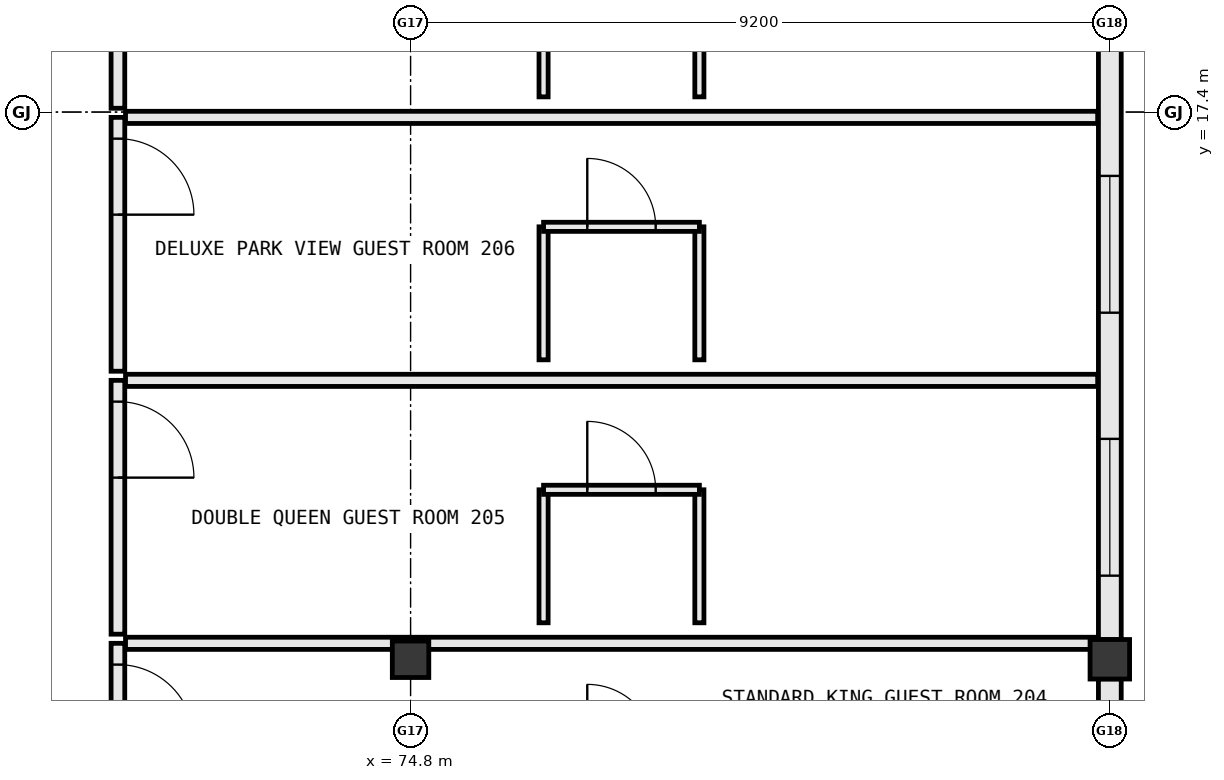
"""IFC4 building model, lengths in metres.
Left out: names, types, materials, properties, quantities, classifications, styles, units other than length and angle.
Written with IfcOpenShell. Run it as: python <this file> out.ifc"""

import sys

from ifc_helpers import new_model, si_unit, direction, frame, frame_2d, origin, origin_2d, place, context, subcontext, project, spatial, rectangle, extrude, element, fill, save


model = new_model("IFC4")
c1 = context("Model", 3, precision=1e-05, world=origin(), true_north=direction((0.0, 1.0)))
c2 = subcontext(c1, "Body", "Model", "MODEL_VIEW")
j1 = project(units=[si_unit("LENGTHUNIT", "METRE"), si_unit("PLANEANGLEUNIT", "RADIAN")], contexts=[c1])
p1 = place(None, origin())
s1 = spatial("IfcSite", under=j1, at=p1, CompositionType="ELEMENT")
p2 = place(p1, origin())
s2 = spatial("IfcBuilding", under=s1, at=p2, CompositionType="ELEMENT")
p3 = place(p2, frame((0.0, 0.0, 27.6)))
s3 = spatial("IfcBuildingStorey", under=s2, at=p3, CompositionType="ELEMENT", Elevation=27.6)
p4 = place(p3, frame((74.8, 10.2, 0.0), z_axis=(0.0, 0.0, 1.0), x_axis=(1.0, 0.0, 0.0)))
e1 = element("IfcColumn", 1, at=p4, inside=s3, PredefinedType="COLUMN", context=c2, shape_type="SweptSolid", body=[
    extrude(rectangle(XDim=0.48, YDim=0.48, at=origin_2d()), origin(), (0.0, 0.0, 1.0), 3.8),
])
p5 = place(p3, frame((84.0, 10.2, 0.0), z_axis=(0.0, 0.0, 1.0), x_axis=(1.0, 0.0, 0.0)))
e2 = element("IfcColumn", 2, at=p5, inside=s3, PredefinedType="COLUMN", context=c2, shape_type="SweptSolid", body=[
    extrude(rectangle(XDim=0.52, YDim=0.52, at=origin_2d()), origin(), (0.0, 0.0, 1.0), 3.8),
])
p6 = place(p3, frame((84.0, 0.858, 0.0), z_axis=(0.0, 0.0, 1.0), x_axis=(0.0, 1.0, 0.0)))
e3 = element("IfcWall", 3, at=p6, inside=s3, PredefinedType="STANDARD", context=c2, shape_type="SweptSolid", body=[
    extrude(rectangle(XDim=9.084, YDim=0.3, at=frame_2d((4.542, 0.0))), origin(), (0.0, 0.0, 1.0), 2.97),
])
p7 = place(p6, frame((0.416, 0.0, 0.85)))
e4 = element("IfcOpeningElement", 4, at=p7, cuts=e3, PredefinedType="OPENING", context=c2, shape_type="SweptSolid", body=[
    extrude(rectangle(XDim=1.8, YDim=1.85, at=frame_2d((0.9, 0.925))), frame((0.0, 0.162, 0.0), z_axis=(0.0, -1.0, 0.0), x_axis=(1.0, 0.0, 0.0)), (0.0, 0.0, 1.0), 0.324),
])
p8 = place(p6, frame((3.522, 0.0, 0.85)))
e5 = element("IfcOpeningElement", 5, at=p8, cuts=e3, PredefinedType="OPENING", context=c2, shape_type="SweptSolid", body=[
    extrude(rectangle(XDim=1.8, YDim=1.85, at=frame_2d((0.9, 0.925))), frame((0.0, 0.162, 0.0), z_axis=(0.0, -1.0, 0.0), x_axis=(1.0, 0.0, 0.0)), (0.0, 0.0, 1.0), 0.324),
])
p9 = place(p6, frame((6.748, 0.0, 0.85)))
e6 = element("IfcOpeningElement", 6, at=p9, cuts=e3, PredefinedType="OPENING", context=c2, shape_type="SweptSolid", body=[
    extrude(rectangle(XDim=1.8, YDim=1.85, at=frame_2d((0.9, 0.925))), frame((0.0, 0.162, 0.0), z_axis=(0.0, -1.0, 0.0), x_axis=(1.0, 0.0, 0.0)), (0.0, 0.0, 1.0), 0.324),
])
p10 = place(p3, frame((84.0, 10.458, 0.0), z_axis=(0.0, 0.0, 1.0), x_axis=(0.0, 1.0, 0.0)))
e7 = element("IfcWall", 7, at=p10, inside=s3, PredefinedType="STANDARD", context=c2, shape_type="SweptSolid", body=[
    extrude(rectangle(XDim=7.884, YDim=0.3, at=frame_2d((3.942, 0.0))), origin(), (0.0, 0.0, 1.0), 2.97),
])
p11 = place(p10, frame((0.842, 0.0, 0.85)))
e8 = element("IfcOpeningElement", 8, at=p11, cuts=e7, PredefinedType="OPENING", context=c2, shape_type="SweptSolid", body=[
    extrude(rectangle(XDim=1.8, YDim=1.85, at=frame_2d((0.9, 0.925))), frame((0.0, 0.162, 0.0), z_axis=(0.0, -1.0, 0.0), x_axis=(1.0, 0.0, 0.0)), (0.0, 0.0, 1.0), 0.324),
])
p12 = place(p10, frame((4.302, 0.0, 0.85)))
e9 = element("IfcOpeningElement", 9, at=p12, cuts=e7, PredefinedType="OPENING", context=c2, shape_type="SweptSolid", body=[
    extrude(rectangle(XDim=1.8, YDim=1.85, at=frame_2d((0.9, 0.925))), frame((0.0, 0.162, 0.0), z_axis=(0.0, -1.0, 0.0), x_axis=(1.0, 0.0, 0.0)), (0.0, 0.0, 1.0), 0.324),
])
p13 = place(p3, frame((70.95, 10.41, 0.0), z_axis=(0.0, 0.0, 1.0), x_axis=(0.0, -1.0, 0.0)))
e10 = element("IfcWall", 10, at=p13, inside=s3, PredefinedType="PARTITIONING", context=c2, shape_type="SweptSolid", body=[
    extrude(rectangle(XDim=3.34, YDim=0.18, at=frame_2d((1.67, 0.0))), origin(), (0.0, 0.0, 1.0), 3.555),
])
p14 = place(p13, frame((0.28, 0.0, 0.0)))
e11 = element("IfcOpeningElement", 11, at=p14, cuts=e10, PredefinedType="OPENING", context=c2, shape_type="SweptSolid", body=[
    extrude(rectangle(XDim=1.0, YDim=2.2, at=frame_2d((0.5, 1.1))), frame((0.0, 0.102, 0.0), z_axis=(0.0, -1.0, 0.0), x_axis=(1.0, 0.0, 0.0)), (0.0, 0.0, 1.0), 0.204),
])
p15 = place(p3, frame((71.05, 10.41, 0.0), z_axis=(0.0, 0.0, 1.0), x_axis=(1.0, 0.0, 0.0)))
e12 = element("IfcWall", 12, at=p15, inside=s3, PredefinedType="PARTITIONING", context=c2, shape_type="SweptSolid", body=[
    extrude(rectangle(XDim=12.79, YDim=0.16, at=frame_2d((6.395, 0.0))), origin(), (0.0, 0.0, 1.0), 2.93),
])
p16 = place(p3, frame((70.95, 13.87, 0.0), z_axis=(0.0, 0.0, 1.0), x_axis=(0.0, -1.0, 0.0)))
e13 = element("IfcWall", 13, at=p16, inside=s3, PredefinedType="PARTITIONING", context=c2, shape_type="SweptSolid", body=[
    extrude(rectangle(XDim=3.34, YDim=0.18, at=frame_2d((1.67, 0.0))), origin(), (0.0, 0.0, 1.0), 3.555),
])
p17 = place(p16, frame((0.28, 0.0, 0.0)))
e14 = element("IfcOpeningElement", 14, at=p17, cuts=e13, PredefinedType="OPENING", context=c2, shape_type="SweptSolid", body=[
    extrude(rectangle(XDim=1.0, YDim=2.2, at=frame_2d((0.5, 1.1))), frame((0.0, 0.102, 0.0), z_axis=(0.0, -1.0, 0.0), x_axis=(1.0, 0.0, 0.0)), (0.0, 0.0, 1.0), 0.204),
])
p18 = place(p3, frame((71.05, 13.87, 0.0), z_axis=(0.0, 0.0, 1.0), x_axis=(1.0, 0.0, 0.0)))
e15 = element("IfcWall", 15, at=p18, inside=s3, PredefinedType="PARTITIONING", context=c2, shape_type="SweptSolid", body=[
    extrude(rectangle(XDim=12.79, YDim=0.16, at=frame_2d((6.395, 0.0))), origin(), (0.0, 0.0, 1.0), 3.555),
])
for number, where, z_axis, x_axis in (
    (16, (76.55, 10.68, 0.0), (0.0, 0.0, 1.0), (0.0, 1.0, 0.0)),
    (17, (78.6, 10.68, 0.0), (0.0, 0.0, 1.0), (0.0, 1.0, 0.0)),
):
    element("IfcWall", number, at=place(p3, frame(where, z_axis=z_axis, x_axis=x_axis)), inside=s3, PredefinedType="PARTITIONING", context=c2, shape_type="SweptSolid", body=[
        extrude(rectangle(XDim=1.75, YDim=0.12, at=frame_2d((0.875, 0.0))), origin(), (0.0, 0.0, 1.0), 3.555),
    ])
p19 = place(p3, frame((76.55, 12.43, 0.0), z_axis=(0.0, 0.0, 1.0), x_axis=(1.0, 0.0, 0.0)))
e18 = element("IfcWall", 18, at=p19, inside=s3, PredefinedType="PARTITIONING", context=c2, shape_type="SweptSolid", body=[
    extrude(rectangle(XDim=2.05, YDim=0.12, at=frame_2d((1.025, 0.0))), origin(), (0.0, 0.0, 1.0), 3.555),
])
p20 = place(p19, frame((0.575, 0.0, 0.0)))
e19 = element("IfcOpeningElement", 19, at=p20, cuts=e18, PredefinedType="OPENING", context=c2, shape_type="SweptSolid", body=[
    extrude(rectangle(XDim=0.9, YDim=2.15, at=frame_2d((0.45, 1.075))), frame((0.0, 0.072, 0.0), z_axis=(0.0, -1.0, 0.0), x_axis=(1.0, 0.0, 0.0)), (0.0, 0.0, 1.0), 0.144),
])
p21 = place(p3, frame((70.95, 17.33, 0.0), z_axis=(0.0, 0.0, 1.0), x_axis=(0.0, -1.0, 0.0)))
e20 = element("IfcWall", 20, at=p21, inside=s3, PredefinedType="PARTITIONING", context=c2, shape_type="SweptSolid", body=[
    extrude(rectangle(XDim=3.34, YDim=0.18, at=frame_2d((1.67, 0.0))), origin(), (0.0, 0.0, 1.0), 3.555),
])
p22 = place(p21, frame((0.28, 0.0, 0.0)))
e21 = element("IfcOpeningElement", 21, at=p22, cuts=e20, PredefinedType="OPENING", context=c2, shape_type="SweptSolid", body=[
    extrude(rectangle(XDim=1.0, YDim=2.2, at=frame_2d((0.5, 1.1))), frame((0.0, 0.102, 0.0), z_axis=(0.0, -1.0, 0.0), x_axis=(1.0, 0.0, 0.0)), (0.0, 0.0, 1.0), 0.204),
])
p23 = place(p3, frame((71.05, 17.33, 0.0), z_axis=(0.0, 0.0, 1.0), x_axis=(1.0, 0.0, 0.0)))
e22 = element("IfcWall", 22, at=p23, inside=s3, PredefinedType="PARTITIONING", context=c2, shape_type="SweptSolid", body=[
    extrude(rectangle(XDim=12.79, YDim=0.16, at=frame_2d((6.395, 0.0))), origin(), (0.0, 0.0, 1.0), 3.555),
])
for number, where, z_axis, x_axis in (
    (23, (76.55, 14.14, 0.0), (0.0, 0.0, 1.0), (0.0, 1.0, 0.0)),
    (24, (78.6, 14.14, 0.0), (0.0, 0.0, 1.0), (0.0, 1.0, 0.0)),
):
    element("IfcWall", number, at=place(p3, frame(where, z_axis=z_axis, x_axis=x_axis)), inside=s3, PredefinedType="PARTITIONING", context=c2, shape_type="SweptSolid", body=[
        extrude(rectangle(XDim=1.75, YDim=0.12, at=frame_2d((0.875, 0.0))), origin(), (0.0, 0.0, 1.0), 3.555),
    ])
p24 = place(p3, frame((76.55, 15.89, 0.0), z_axis=(0.0, 0.0, 1.0), x_axis=(1.0, 0.0, 0.0)))
e25 = element("IfcWall", 25, at=p24, inside=s3, PredefinedType="PARTITIONING", context=c2, shape_type="SweptSolid", body=[
    extrude(rectangle(XDim=2.05, YDim=0.12, at=frame_2d((1.025, 0.0))), origin(), (0.0, 0.0, 1.0), 3.555),
])
p25 = place(p24, frame((0.575, 0.0, 0.0)))
e26 = element("IfcOpeningElement", 26, at=p25, cuts=e25, PredefinedType="OPENING", context=c2, shape_type="SweptSolid", body=[
    extrude(rectangle(XDim=0.9, YDim=2.15, at=frame_2d((0.45, 1.075))), frame((0.0, 0.072, 0.0), z_axis=(0.0, -1.0, 0.0), x_axis=(1.0, 0.0, 0.0)), (0.0, 0.0, 1.0), 0.144),
])
p26 = place(p3, frame((70.95, 20.79, 0.0), z_axis=(0.0, 0.0, 1.0), x_axis=(0.0, -1.0, 0.0)))
e27 = element("IfcWall", 27, at=p26, inside=s3, PredefinedType="PARTITIONING", context=c2, shape_type="SweptSolid", body=[
    extrude(rectangle(XDim=3.34, YDim=0.18, at=frame_2d((1.67, 0.0))), origin(), (0.0, 0.0, 1.0), 3.555),
])
p27 = place(p26, frame((0.28, 0.0, 0.0)))
e28 = element("IfcOpeningElement", 28, at=p27, cuts=e27, PredefinedType="OPENING", context=c2, shape_type="SweptSolid", body=[
    extrude(rectangle(XDim=1.0, YDim=2.2, at=frame_2d((0.5, 1.1))), frame((0.0, 0.102, 0.0), z_axis=(0.0, -1.0, 0.0), x_axis=(1.0, 0.0, 0.0)), (0.0, 0.0, 1.0), 0.204),
])
for number, where, z_axis, x_axis in (
    (29, (76.55, 17.6, 0.0), (0.0, 0.0, 1.0), (0.0, 1.0, 0.0)),
    (30, (78.6, 17.6, 0.0), (0.0, 0.0, 1.0), (0.0, 1.0, 0.0)),
):
    element("IfcWall", number, at=place(p3, frame(where, z_axis=z_axis, x_axis=x_axis)), inside=s3, PredefinedType="PARTITIONING", context=c2, shape_type="SweptSolid", body=[
        extrude(rectangle(XDim=1.75, YDim=0.12, at=frame_2d((0.875, 0.0))), origin(), (0.0, 0.0, 1.0), 3.555),
    ])
p28 = place(p11, origin())
e31 = element("IfcWindow", 31, at=p28, inside=s3, PartitioningType="SINGLE_PANEL", PredefinedType="WINDOW", context=c2, shape_type="SweptSolid", body=[
    extrude(rectangle(XDim=1.8, YDim=1.85, at=frame_2d((0.9, 0.925))), frame((0.0, 0.03, 0.0), z_axis=(0.0, -1.0, 0.0), x_axis=(1.0, 0.0, 0.0)), (0.0, 0.0, 1.0), 0.06),
])
fill(e8, e31)
p29 = place(p12, origin())
e32 = element("IfcWindow", 32, at=p29, inside=s3, PartitioningType="SINGLE_PANEL", PredefinedType="WINDOW", context=c2, shape_type="SweptSolid", body=[
    extrude(rectangle(XDim=1.8, YDim=1.85, at=frame_2d((0.9, 0.925))), frame((0.0, 0.03, 0.0), z_axis=(0.0, -1.0, 0.0), x_axis=(1.0, 0.0, 0.0)), (0.0, 0.0, 1.0), 0.06),
])
fill(e9, e32)
p30 = place(p14, origin())
e33 = element("IfcDoor", 33, at=p30, inside=s3, OperationType="SINGLE_SWING_RIGHT", PredefinedType="DOOR", context=c2, shape_type="SweptSolid", body=[
    extrude(rectangle(XDim=1.0, YDim=2.2, at=frame_2d((0.5, 1.1))), frame((0.0, 0.025, 0.0), z_axis=(0.0, -1.0, 0.0), x_axis=(1.0, 0.0, 0.0)), (0.0, 0.0, 1.0), 0.05),
])
fill(e11, e33)
p31 = place(p17, origin())
e34 = element("IfcDoor", 34, at=p31, inside=s3, OperationType="SINGLE_SWING_RIGHT", PredefinedType="DOOR", context=c2, shape_type="SweptSolid", body=[
    extrude(rectangle(XDim=1.0, YDim=2.2, at=frame_2d((0.5, 1.1))), frame((0.0, 0.025, 0.0), z_axis=(0.0, -1.0, 0.0), x_axis=(1.0, 0.0, 0.0)), (0.0, 0.0, 1.0), 0.05),
])
fill(e14, e34)
p32 = place(p20, origin())
e35 = element("IfcDoor", 35, at=p32, inside=s3, OperationType="SINGLE_SWING_LEFT", PredefinedType="DOOR", context=c2, shape_type="SweptSolid", body=[
    extrude(rectangle(XDim=0.9, YDim=2.15, at=frame_2d((0.45, 1.075))), frame((0.0, 0.025, 0.0), z_axis=(0.0, -1.0, 0.0), x_axis=(1.0, 0.0, 0.0)), (0.0, 0.0, 1.0), 0.05),
])
fill(e19, e35)
p33 = place(p22, origin())
e36 = element("IfcDoor", 36, at=p33, inside=s3, OperationType="SINGLE_SWING_RIGHT", PredefinedType="DOOR", context=c2, shape_type="SweptSolid", body=[
    extrude(rectangle(XDim=1.0, YDim=2.2, at=frame_2d((0.5, 1.1))), frame((0.0, 0.025, 0.0), z_axis=(0.0, -1.0, 0.0), x_axis=(1.0, 0.0, 0.0)), (0.0, 0.0, 1.0), 0.05),
])
fill(e21, e36)
p34 = place(p25, origin())
e37 = element("IfcDoor", 37, at=p34, inside=s3, OperationType="SINGLE_SWING_LEFT", PredefinedType="DOOR", context=c2, shape_type="SweptSolid", body=[
    extrude(rectangle(XDim=0.9, YDim=2.15, at=frame_2d((0.45, 1.075))), frame((0.0, 0.025, 0.0), z_axis=(0.0, -1.0, 0.0), x_axis=(1.0, 0.0, 0.0)), (0.0, 0.0, 1.0), 0.05),
])
fill(e26, e37)
save(model, sys.argv[1])
